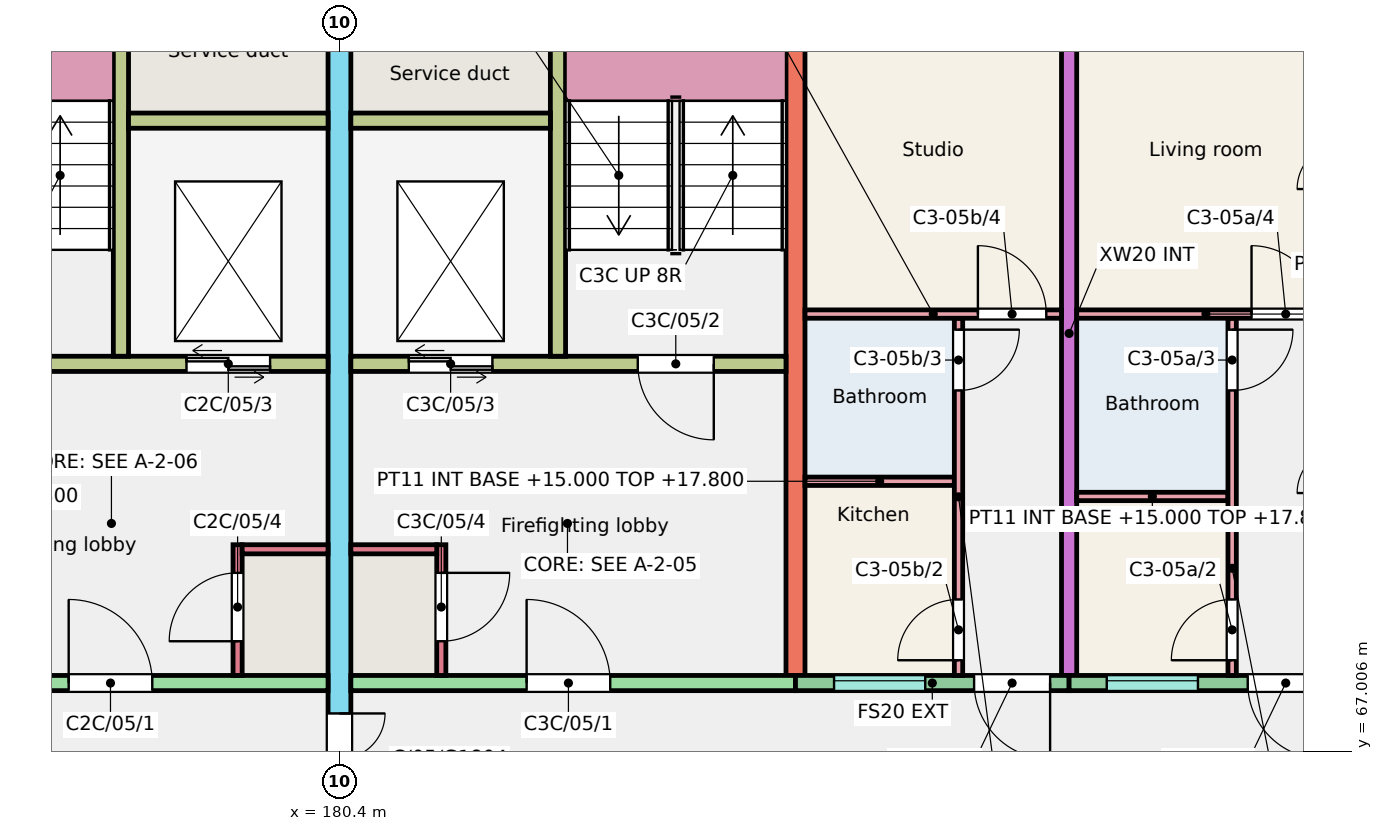
"""IFC4 building model, lengths in metres.
Left out: names, types, materials, properties, quantities, classifications, styles, units other than length and angle.
Written with IfcOpenShell. Run it as: python <this file> out.ifc"""

import sys

from ifc_helpers import new_model, si_unit, direction, frame, frame_2d, origin, place, context, subcontext, project, spatial, rectangle, extrude, element, fill, save


model = new_model("IFC4")
c1 = context("Model", 3, precision=1e-05, world=origin(), true_north=direction((0.0, 1.0)))
c2 = subcontext(c1, "Body", "Model", "MODEL_VIEW")
j1 = project(units=[si_unit("LENGTHUNIT", "METRE"), si_unit("PLANEANGLEUNIT", "RADIAN")], contexts=[c1])
p1 = place(None, origin())
s1 = spatial("IfcSite", under=j1, at=p1, CompositionType="ELEMENT")
p2 = place(p1, origin())
s2 = spatial("IfcBuilding", under=s1, at=p2, CompositionType="ELEMENT")
p3 = place(p2, frame((0.0, 0.0, 15.0)))
s3 = spatial("IfcBuildingStorey", under=s2, at=p3, CompositionType="ELEMENT", Elevation=15.0)
p4 = place(p3, frame((180.4, 66.0, 0.0), z_axis=(0.0, 0.0, 1.0), x_axis=(0.0, 1.0, 0.0)))
e1 = element("IfcWall", 1, at=p4, inside=s3, PredefinedType="SHEAR", context=c2, shape_type="SweptSolid", body=[
    extrude(rectangle(XDim=11.0, YDim=0.3, at=frame_2d((5.5, 0.0))), origin(), (0.0, 0.0, 1.0), 3.0),
])
p5 = place(p4, frame((0.3, 0.0, 0.0)))
e2 = element("IfcOpeningElement", 2, at=p5, cuts=e1, PredefinedType="OPENING", context=c2, shape_type="SweptSolid", body=[
    extrude(rectangle(XDim=1.2, YDim=2.1, at=frame_2d((0.6, 1.05))), frame((0.0, 0.16, 0.0), z_axis=(0.0, -1.0, 0.0), x_axis=(1.0, 0.0, 0.0)), (0.0, 0.0, 1.0), 0.32),
])
p6 = place(p3, frame((186.4, 68.0, 0.0), z_axis=(0.0, 0.0, 1.0), x_axis=(0.0, 1.0, 0.0)))
e3 = element("IfcWall", 3, at=p6, inside=s3, PredefinedType="SHEAR", context=c2, shape_type="SweptSolid", body=[
    extrude(rectangle(XDim=9.0, YDim=0.25, at=frame_2d((4.5, 0.0))), origin(), (0.0, 0.0, 1.0), 3.0),
])
p7 = place(p3, frame((190.0, 68.0, 0.0), z_axis=(0.0, 0.0, 1.0), x_axis=(0.0, 1.0, 0.0)))
e4 = element("IfcWall", 4, at=p7, inside=s3, PredefinedType="SHEAR", context=c2, shape_type="SweptSolid", body=[
    extrude(rectangle(XDim=9.0, YDim=0.2, at=frame_2d((4.5, 0.0))), origin(), (0.0, 0.0, 1.0), 3.0),
])
p8 = place(p3, frame((174.4, 67.9, 0.0), z_axis=(0.0, 0.0, 1.0), x_axis=(1.0, 0.0, 0.0)))
e5 = element("IfcWall", 5, at=p8, inside=s3, PredefinedType="SHEAR", context=c2, shape_type="SweptSolid", body=[
    extrude(rectangle(XDim=5.85, YDim=0.2, at=frame_2d((2.925, 0.0))), origin(), (0.0, 0.0, 1.0), 3.0),
])
p9 = place(p8, frame((2.438, 0.0, 0.0)))
e6 = element("IfcOpeningElement", 6, at=p9, cuts=e5, PredefinedType="OPENING", context=c2, shape_type="SweptSolid", body=[
    extrude(rectangle(XDim=1.1, YDim=2.1, at=frame_2d((0.55, 1.05))), frame((0.0, 0.11, 0.0), z_axis=(0.0, -1.0, 0.0), x_axis=(1.0, 0.0, 0.0)), (0.0, 0.0, 1.0), 0.22),
])
p10 = place(p3, frame((174.525, 72.1, 0.0), z_axis=(0.0, 0.0, 1.0), x_axis=(1.0, 0.0, 0.0)))
e7 = element("IfcWall", 7, at=p10, inside=s3, PredefinedType="SHEAR", context=c2, shape_type="SweptSolid", body=[
    extrude(rectangle(XDim=5.725, YDim=0.2, at=frame_2d((2.863, 0.0))), origin(), (0.0, 0.0, 1.0), 3.0),
])
p11 = place(p10, frame((0.95, 0.0, 0.0)))
e8 = element("IfcOpeningElement", 8, at=p11, cuts=e7, PredefinedType="OPENING", context=c2, shape_type="SweptSolid", body=[
    extrude(rectangle(XDim=1.0, YDim=2.1, at=frame_2d((0.5, 1.05))), frame((0.0, 0.11, 0.0), z_axis=(0.0, -1.0, 0.0), x_axis=(1.0, 0.0, 0.0)), (0.0, 0.0, 1.0), 0.22),
])
p12 = place(p10, frame((3.863, 0.0, 0.0)))
e9 = element("IfcOpeningElement", 9, at=p12, cuts=e7, PredefinedType="OPENING", context=c2, shape_type="SweptSolid", body=[
    extrude(rectangle(XDim=1.1, YDim=2.1, at=frame_2d((0.55, 1.05))), frame((0.0, 0.11, 0.0), z_axis=(0.0, -1.0, 0.0), x_axis=(1.0, 0.0, 0.0)), (0.0, 0.0, 1.0), 0.22),
])
p13 = place(p3, frame((177.525, 72.2, 0.0), z_axis=(0.0, 0.0, 1.0), x_axis=(0.0, 1.0, 0.0)))
e10 = element("IfcWall", 10, at=p13, inside=s3, PredefinedType="SHEAR", context=c2, shape_type="SweptSolid", body=[
    extrude(rectangle(XDim=4.8, YDim=0.2, at=frame_2d((2.4, 0.0))), origin(), (0.0, 0.0, 1.0), 3.0),
])
p14 = place(p3, frame((177.625, 75.3, 0.0), z_axis=(0.0, 0.0, 1.0), x_axis=(1.0, 0.0, 0.0)))
e11 = element("IfcWall", 11, at=p14, inside=s3, PredefinedType="SHEAR", context=c2, shape_type="SweptSolid", body=[
    extrude(rectangle(XDim=2.625, YDim=0.2, at=frame_2d((1.312, 0.0))), origin(), (0.0, 0.0, 1.0), 3.0),
])
p15 = place(p3, frame((179.06, 68.0, 0.0), z_axis=(0.0, 0.0, 1.0), x_axis=(0.0, 1.0, 0.0)))
e12 = element("IfcWall", 12, at=p15, inside=s3, PredefinedType="SHEAR", context=c2, shape_type="SweptSolid", body=[
    extrude(rectangle(XDim=1.72, YDim=0.12, at=frame_2d((0.86, 0.0))), origin(), (0.0, 0.0, 1.0), 3.0),
])
p16 = place(p15, frame((0.45, 0.0, 0.0)))
e13 = element("IfcOpeningElement", 13, at=p16, cuts=e12, PredefinedType="OPENING", context=c2, shape_type="SweptSolid", body=[
    extrude(rectangle(XDim=0.9, YDim=2.1, at=frame_2d((0.45, 1.05))), frame((0.0, 0.07, 0.0), z_axis=(0.0, -1.0, 0.0), x_axis=(1.0, 0.0, 0.0)), (0.0, 0.0, 1.0), 0.14),
])
p17 = place(p3, frame((179.12, 69.66, 0.0), z_axis=(0.0, 0.0, 1.0), x_axis=(1.0, 0.0, 0.0)))
e14 = element("IfcWall", 14, at=p17, inside=s3, PredefinedType="SHEAR", context=c2, shape_type="SweptSolid", body=[
    extrude(rectangle(XDim=1.13, YDim=0.12, at=frame_2d((0.565, 0.0))), origin(), (0.0, 0.0, 1.0), 3.0),
])
p18 = place(p3, frame((180.55, 67.9, 0.0), z_axis=(0.0, 0.0, 1.0), x_axis=(1.0, 0.0, 0.0)))
e15 = element("IfcWall", 15, at=p18, inside=s3, PredefinedType="SHEAR", context=c2, shape_type="SweptSolid", body=[
    extrude(rectangle(XDim=5.85, YDim=0.2, at=frame_2d((2.925, 0.0))), origin(), (0.0, 0.0, 1.0), 3.0),
])
p19 = place(p18, frame((2.312, 0.0, 0.0)))
e16 = element("IfcOpeningElement", 16, at=p19, cuts=e15, PredefinedType="OPENING", context=c2, shape_type="SweptSolid", body=[
    extrude(rectangle(XDim=1.1, YDim=2.1, at=frame_2d((0.55, 1.05))), frame((0.0, 0.11, 0.0), z_axis=(0.0, -1.0, 0.0), x_axis=(1.0, 0.0, 0.0)), (0.0, 0.0, 1.0), 0.22),
])
p20 = place(p3, frame((180.55, 72.1, 0.0), z_axis=(0.0, 0.0, 1.0), x_axis=(1.0, 0.0, 0.0)))
e17 = element("IfcWall", 17, at=p20, inside=s3, PredefinedType="SHEAR", context=c2, shape_type="SweptSolid", body=[
    extrude(rectangle(XDim=5.725, YDim=0.2, at=frame_2d((2.862, 0.0))), origin(), (0.0, 0.0, 1.0), 3.0),
])
p21 = place(p20, frame((3.775, 0.0, 0.0)))
e18 = element("IfcOpeningElement", 18, at=p21, cuts=e17, PredefinedType="OPENING", context=c2, shape_type="SweptSolid", body=[
    extrude(rectangle(XDim=1.0, YDim=2.1, at=frame_2d((0.5, 1.05))), frame((0.0, 0.11, 0.0), z_axis=(0.0, -1.0, 0.0), x_axis=(1.0, 0.0, 0.0)), (0.0, 0.0, 1.0), 0.22),
])
p22 = place(p20, frame((0.762, 0.0, 0.0)))
e19 = element("IfcOpeningElement", 19, at=p22, cuts=e17, PredefinedType="OPENING", context=c2, shape_type="SweptSolid", body=[
    extrude(rectangle(XDim=1.1, YDim=2.1, at=frame_2d((0.55, 1.05))), frame((0.0, 0.11, 0.0), z_axis=(0.0, -1.0, 0.0), x_axis=(1.0, 0.0, 0.0)), (0.0, 0.0, 1.0), 0.22),
])
p23 = place(p3, frame((183.275, 72.2, 0.0), z_axis=(0.0, 0.0, 1.0), x_axis=(0.0, 1.0, 0.0)))
e20 = element("IfcWall", 20, at=p23, inside=s3, PredefinedType="SHEAR", context=c2, shape_type="SweptSolid", body=[
    extrude(rectangle(XDim=4.8, YDim=0.2, at=frame_2d((2.4, 0.0))), origin(), (0.0, 0.0, 1.0), 3.0),
])
p24 = place(p3, frame((180.55, 75.3, 0.0), z_axis=(0.0, 0.0, 1.0), x_axis=(1.0, 0.0, 0.0)))
e21 = element("IfcWall", 21, at=p24, inside=s3, PredefinedType="SHEAR", context=c2, shape_type="SweptSolid", body=[
    extrude(rectangle(XDim=2.625, YDim=0.2, at=frame_2d((1.312, 0.0))), origin(), (0.0, 0.0, 1.0), 3.0),
])
p25 = place(p3, frame((181.74, 68.0, 0.0), z_axis=(0.0, 0.0, 1.0), x_axis=(0.0, 1.0, 0.0)))
e22 = element("IfcWall", 22, at=p25, inside=s3, PredefinedType="SHEAR", context=c2, shape_type="SweptSolid", body=[
    extrude(rectangle(XDim=1.72, YDim=0.12, at=frame_2d((0.86, 0.0))), origin(), (0.0, 0.0, 1.0), 3.0),
])
p26 = place(p25, frame((0.45, 0.0, 0.0)))
e23 = element("IfcOpeningElement", 23, at=p26, cuts=e22, PredefinedType="OPENING", context=c2, shape_type="SweptSolid", body=[
    extrude(rectangle(XDim=0.9, YDim=2.1, at=frame_2d((0.45, 1.05))), frame((0.0, 0.07, 0.0), z_axis=(0.0, -1.0, 0.0), x_axis=(1.0, 0.0, 0.0)), (0.0, 0.0, 1.0), 0.14),
])
p27 = place(p3, frame((180.55, 69.66, 0.0), z_axis=(0.0, 0.0, 1.0), x_axis=(1.0, 0.0, 0.0)))
e24 = element("IfcWall", 24, at=p27, inside=s3, PredefinedType="SHEAR", context=c2, shape_type="SweptSolid", body=[
    extrude(rectangle(XDim=1.13, YDim=0.12, at=frame_2d((0.565, 0.0))), origin(), (0.0, 0.0, 1.0), 3.0),
])
p28 = place(p3, frame((186.4, 67.9, 0.0), z_axis=(0.0, 0.0, 1.0), x_axis=(1.0, 0.0, 0.0)))
e25 = element("IfcWall", 25, at=p28, inside=s3, PredefinedType="SOLIDWALL", context=c2, shape_type="SweptSolid", body=[
    extrude(rectangle(XDim=3.6, YDim=0.2, at=frame_2d((1.8, 0.0))), origin(), (0.0, 0.0, 1.0), 3.0),
])
p29 = place(p28, frame((0.508, 0.0, 1.1)))
e26 = element("IfcOpeningElement", 26, at=p29, cuts=e25, PredefinedType="OPENING", context=c2, shape_type="SweptSolid", body=[
    extrude(rectangle(XDim=1.2, YDim=1.3, at=frame_2d((0.6, 0.65))), frame((0.0, 0.11, 0.0), z_axis=(0.0, -1.0, 0.0), x_axis=(1.0, 0.0, 0.0)), (0.0, 0.0, 1.0), 0.22),
])
p30 = place(p28, frame((2.35, 0.0, 0.0)))
e27 = element("IfcOpeningElement", 27, at=p30, cuts=e25, PredefinedType="OPENING", context=c2, shape_type="SweptSolid", body=[
    extrude(rectangle(XDim=1.0, YDim=2.1, at=frame_2d((0.5, 1.05))), frame((0.0, 0.11, 0.0), z_axis=(0.0, -1.0, 0.0), x_axis=(1.0, 0.0, 0.0)), (0.0, 0.0, 1.0), 0.22),
])
p31 = place(p3, frame((190.0, 67.9, 0.0), z_axis=(0.0, 0.0, 1.0), x_axis=(1.0, 0.0, 0.0)))
e28 = element("IfcWall", 28, at=p31, inside=s3, PredefinedType="SOLIDWALL", context=c2, shape_type="SweptSolid", body=[
    extrude(rectangle(XDim=3.6, YDim=0.2, at=frame_2d((1.8, 0.0))), origin(), (0.0, 0.0, 1.0), 3.0),
])
p32 = place(p31, frame((0.495, 0.0, 1.1)))
e29 = element("IfcOpeningElement", 29, at=p32, cuts=e28, PredefinedType="OPENING", context=c2, shape_type="SweptSolid", body=[
    extrude(rectangle(XDim=1.2, YDim=1.3, at=frame_2d((0.6, 0.65))), frame((0.0, 0.11, 0.0), z_axis=(0.0, -1.0, 0.0), x_axis=(1.0, 0.0, 0.0)), (0.0, 0.0, 1.0), 0.22),
])
p33 = place(p31, frame((2.35, 0.0, 0.0)))
e30 = element("IfcOpeningElement", 30, at=p33, cuts=e28, PredefinedType="OPENING", context=c2, shape_type="SweptSolid", body=[
    extrude(rectangle(XDim=1.0, YDim=2.1, at=frame_2d((0.5, 1.05))), frame((0.0, 0.11, 0.0), z_axis=(0.0, -1.0, 0.0), x_axis=(1.0, 0.0, 0.0)), (0.0, 0.0, 1.0), 0.22),
])
p34 = place(p3, frame((190.1, 70.355, 0.0), z_axis=(0.0, 0.0, 1.0), x_axis=(1.0, 0.0, 0.0)))
e31 = element("IfcWall", 31, at=p34, inside=s3, PredefinedType="PARTITIONING", context=c2, shape_type="SweptSolid", body=[
    extrude(rectangle(XDim=1.99, YDim=0.11, at=frame_2d((0.995, 0.0))), origin(), (0.0, 0.0, 1.0), 2.8),
])
p35 = place(p3, frame((192.145, 68.0, 0.0), z_axis=(0.0, 0.0, 1.0), x_axis=(0.0, 1.0, 0.0)))
e32 = element("IfcWall", 32, at=p35, inside=s3, PredefinedType="PARTITIONING", context=c2, shape_type="SweptSolid", body=[
    extrude(rectangle(XDim=4.7, YDim=0.11, at=frame_2d((2.35, 0.0))), origin(), (0.0, 0.0, 1.0), 2.8),
])
p36 = place(p35, frame((0.2, 0.0, 0.0)))
e33 = element("IfcOpeningElement", 33, at=p36, cuts=e32, PredefinedType="OPENING", context=c2, shape_type="SweptSolid", body=[
    extrude(rectangle(XDim=0.8, YDim=2.1, at=frame_2d((0.4, 1.05))), frame((0.0, 0.065, 0.0), z_axis=(0.0, -1.0, 0.0), x_axis=(1.0, 0.0, 0.0)), (0.0, 0.0, 1.0), 0.13),
])
p37 = place(p35, frame((3.75, 0.0, 0.0)))
e34 = element("IfcOpeningElement", 34, at=p37, cuts=e32, PredefinedType="OPENING", context=c2, shape_type="SweptSolid", body=[
    extrude(rectangle(XDim=0.8, YDim=2.1, at=frame_2d((0.4, 1.05))), frame((0.0, 0.065, 0.0), z_axis=(0.0, -1.0, 0.0), x_axis=(1.0, 0.0, 0.0)), (0.0, 0.0, 1.0), 0.13),
])
p38 = place(p3, frame((190.1, 72.755, 0.0), z_axis=(0.0, 0.0, 1.0), x_axis=(1.0, 0.0, 0.0)))
e35 = element("IfcWall", 35, at=p38, inside=s3, PredefinedType="PARTITIONING", context=c2, shape_type="SweptSolid", body=[
    extrude(rectangle(XDim=3.4, YDim=0.11, at=frame_2d((1.7, 0.0))), origin(), (0.0, 0.0, 1.0), 2.8),
])
p39 = place(p38, frame((2.3, 0.0, 0.0)))
e36 = element("IfcOpeningElement", 36, at=p39, cuts=e35, PredefinedType="OPENING", context=c2, shape_type="SweptSolid", body=[
    extrude(rectangle(XDim=0.9, YDim=2.1, at=frame_2d((0.45, 1.05))), frame((0.0, 0.065, 0.0), z_axis=(0.0, -1.0, 0.0), x_axis=(1.0, 0.0, 0.0)), (0.0, 0.0, 1.0), 0.13),
])
p40 = place(p3, frame((186.525, 70.555, 0.0), z_axis=(0.0, 0.0, 1.0), x_axis=(1.0, 0.0, 0.0)))
e37 = element("IfcWall", 37, at=p40, inside=s3, PredefinedType="PARTITIONING", context=c2, shape_type="SweptSolid", body=[
    extrude(rectangle(XDim=1.965, YDim=0.11, at=frame_2d((0.982, 0.0))), origin(), (0.0, 0.0, 1.0), 2.8),
])
p41 = place(p3, frame((188.545, 68.0, 0.0), z_axis=(0.0, 0.0, 1.0), x_axis=(0.0, 1.0, 0.0)))
e38 = element("IfcWall", 38, at=p41, inside=s3, PredefinedType="PARTITIONING", context=c2, shape_type="SweptSolid", body=[
    extrude(rectangle(XDim=4.7, YDim=0.11, at=frame_2d((2.35, 0.0))), origin(), (0.0, 0.0, 1.0), 2.8),
])
p42 = place(p41, frame((0.2, 0.0, 0.0)))
e39 = element("IfcOpeningElement", 39, at=p42, cuts=e38, PredefinedType="OPENING", context=c2, shape_type="SweptSolid", body=[
    extrude(rectangle(XDim=0.8, YDim=2.1, at=frame_2d((0.4, 1.05))), frame((0.0, 0.065, 0.0), z_axis=(0.0, -1.0, 0.0), x_axis=(1.0, 0.0, 0.0)), (0.0, 0.0, 1.0), 0.13),
])
p43 = place(p41, frame((3.75, 0.0, 0.0)))
e40 = element("IfcOpeningElement", 40, at=p43, cuts=e38, PredefinedType="OPENING", context=c2, shape_type="SweptSolid", body=[
    extrude(rectangle(XDim=0.8, YDim=2.1, at=frame_2d((0.4, 1.05))), frame((0.0, 0.065, 0.0), z_axis=(0.0, -1.0, 0.0), x_axis=(1.0, 0.0, 0.0)), (0.0, 0.0, 1.0), 0.13),
])
p44 = place(p3, frame((186.525, 72.755, 0.0), z_axis=(0.0, 0.0, 1.0), x_axis=(1.0, 0.0, 0.0)))
e41 = element("IfcWall", 41, at=p44, inside=s3, PredefinedType="PARTITIONING", context=c2, shape_type="SweptSolid", body=[
    extrude(rectangle(XDim=3.375, YDim=0.11, at=frame_2d((1.688, 0.0))), origin(), (0.0, 0.0, 1.0), 2.8),
])
p45 = place(p44, frame((2.275, 0.0, 0.0)))
e42 = element("IfcOpeningElement", 42, at=p45, cuts=e41, PredefinedType="OPENING", context=c2, shape_type="SweptSolid", body=[
    extrude(rectangle(XDim=0.9, YDim=2.1, at=frame_2d((0.45, 1.05))), frame((0.0, 0.065, 0.0), z_axis=(0.0, -1.0, 0.0), x_axis=(1.0, 0.0, 0.0)), (0.0, 0.0, 1.0), 0.13),
])
p46 = place(p32, origin())
e43 = element("IfcWindow", 43, at=p46, inside=s3, PartitioningType="SINGLE_PANEL", PredefinedType="WINDOW", context=c2, shape_type="SweptSolid", body=[
    extrude(rectangle(XDim=1.2, YDim=1.3, at=frame_2d((0.6, 0.65))), frame((0.0, 0.06, 0.0), z_axis=(0.0, -1.0, 0.0), x_axis=(1.0, 0.0, 0.0)), (0.0, 0.0, 1.0), 0.06),
])
fill(e29, e43)
p47 = place(p29, origin())
e44 = element("IfcWindow", 44, at=p47, inside=s3, PartitioningType="SINGLE_PANEL", PredefinedType="WINDOW", context=c2, shape_type="SweptSolid", body=[
    extrude(rectangle(XDim=1.2, YDim=1.3, at=frame_2d((0.6, 0.65))), frame((0.0, 0.06, 0.0), z_axis=(0.0, -1.0, 0.0), x_axis=(1.0, 0.0, 0.0)), (0.0, 0.0, 1.0), 0.06),
])
fill(e26, e44)
p48 = place(p33, origin())
e45 = element("IfcDoor", 45, at=p48, inside=s3, OperationType="SINGLE_SWING_RIGHT", PredefinedType="DOOR", context=c2, shape_type="SweptSolid", body=[
    extrude(rectangle(XDim=1.0, YDim=2.1, at=frame_2d((0.5, 1.05))), frame((0.0, 0.025, 0.0), z_axis=(0.0, -1.0, 0.0), x_axis=(1.0, 0.0, 0.0)), (0.0, 0.0, 1.0), 0.05),
])
fill(e30, e45)
p49 = place(p36, origin())
e46 = element("IfcDoor", 46, at=p49, inside=s3, OperationType="SINGLE_SWING_LEFT", PredefinedType="DOOR", context=c2, shape_type="SweptSolid", body=[
    extrude(rectangle(XDim=0.8, YDim=2.1, at=frame_2d((0.4, 1.05))), frame((0.0, 0.025, 0.0), z_axis=(0.0, -1.0, 0.0), x_axis=(1.0, 0.0, 0.0)), (0.0, 0.0, 1.0), 0.05),
])
fill(e33, e46)
p50 = place(p37, origin())
e47 = element("IfcDoor", 47, at=p50, inside=s3, OperationType="SINGLE_SWING_RIGHT", PredefinedType="DOOR", context=c2, shape_type="SweptSolid", body=[
    extrude(rectangle(XDim=0.8, YDim=2.1, at=frame_2d((0.4, 1.05))), frame((0.0, 0.025, 0.0), z_axis=(0.0, -1.0, 0.0), x_axis=(1.0, 0.0, 0.0)), (0.0, 0.0, 1.0), 0.05),
])
fill(e34, e47)
p51 = place(p39, origin())
e48 = element("IfcDoor", 48, at=p51, inside=s3, OperationType="SINGLE_SWING_LEFT", PredefinedType="DOOR", context=c2, shape_type="SweptSolid", body=[
    extrude(rectangle(XDim=0.9, YDim=2.1, at=frame_2d((0.45, 1.05))), frame((0.0, 0.025, 0.0), z_axis=(0.0, -1.0, 0.0), x_axis=(1.0, 0.0, 0.0)), (0.0, 0.0, 1.0), 0.05),
])
fill(e36, e48)
p52 = place(p30, origin())
e49 = element("IfcDoor", 49, at=p52, inside=s3, OperationType="SINGLE_SWING_RIGHT", PredefinedType="DOOR", context=c2, shape_type="SweptSolid", body=[
    extrude(rectangle(XDim=1.0, YDim=2.1, at=frame_2d((0.5, 1.05))), frame((0.0, 0.025, 0.0), z_axis=(0.0, -1.0, 0.0), x_axis=(1.0, 0.0, 0.0)), (0.0, 0.0, 1.0), 0.05),
])
fill(e27, e49)
p53 = place(p42, origin())
e50 = element("IfcDoor", 50, at=p53, inside=s3, OperationType="SINGLE_SWING_LEFT", PredefinedType="DOOR", context=c2, shape_type="SweptSolid", body=[
    extrude(rectangle(XDim=0.8, YDim=2.1, at=frame_2d((0.4, 1.05))), frame((0.0, 0.025, 0.0), z_axis=(0.0, -1.0, 0.0), x_axis=(1.0, 0.0, 0.0)), (0.0, 0.0, 1.0), 0.05),
])
fill(e39, e50)
p54 = place(p43, origin())
e51 = element("IfcDoor", 51, at=p54, inside=s3, OperationType="SINGLE_SWING_RIGHT", PredefinedType="DOOR", context=c2, shape_type="SweptSolid", body=[
    extrude(rectangle(XDim=0.8, YDim=2.1, at=frame_2d((0.4, 1.05))), frame((0.0, 0.025, 0.0), z_axis=(0.0, -1.0, 0.0), x_axis=(1.0, 0.0, 0.0)), (0.0, 0.0, 1.0), 0.05),
])
fill(e40, e51)
p55 = place(p45, origin())
e52 = element("IfcDoor", 52, at=p55, inside=s3, OperationType="SINGLE_SWING_LEFT", PredefinedType="DOOR", context=c2, shape_type="SweptSolid", body=[
    extrude(rectangle(XDim=0.9, YDim=2.1, at=frame_2d((0.45, 1.05))), frame((0.0, 0.025, 0.0), z_axis=(0.0, -1.0, 0.0), x_axis=(1.0, 0.0, 0.0)), (0.0, 0.0, 1.0), 0.05),
])
fill(e42, e52)
p56 = place(p9, origin())
e53 = element("IfcDoor", 53, at=p56, inside=s3, OperationType="SINGLE_SWING_LEFT", PredefinedType="DOOR", context=c2, shape_type="SweptSolid", body=[
    extrude(rectangle(XDim=1.1, YDim=2.1, at=frame_2d((0.55, 1.05))), frame((0.0, 0.025, 0.0), z_axis=(0.0, -1.0, 0.0), x_axis=(1.0, 0.0, 0.0)), (0.0, 0.0, 1.0), 0.05),
])
fill(e6, e53)
p57 = place(p12, origin())
e54 = element("IfcDoor", 54, at=p57, inside=s3, OperationType="DOUBLE_DOOR_SLIDING", PredefinedType="DOOR", context=c2, shape_type="SweptSolid", body=[
    extrude(rectangle(XDim=1.1, YDim=2.1, at=frame_2d((0.55, 1.05))), frame((0.0, 0.025, 0.0), z_axis=(0.0, -1.0, 0.0), x_axis=(1.0, 0.0, 0.0)), (0.0, 0.0, 1.0), 0.05),
])
fill(e9, e54)
p58 = place(p16, origin())
e55 = element("IfcDoor", 55, at=p58, inside=s3, OperationType="SINGLE_SWING_LEFT", PredefinedType="DOOR", context=c2, shape_type="SweptSolid", body=[
    extrude(rectangle(XDim=0.9, YDim=2.1, at=frame_2d((0.45, 1.05))), frame((0.0, 0.025, 0.0), z_axis=(0.0, -1.0, 0.0), x_axis=(1.0, 0.0, 0.0)), (0.0, 0.0, 1.0), 0.05),
])
fill(e13, e55)
p59 = place(p19, origin())
e56 = element("IfcDoor", 56, at=p59, inside=s3, OperationType="SINGLE_SWING_LEFT", PredefinedType="DOOR", context=c2, shape_type="SweptSolid", body=[
    extrude(rectangle(XDim=1.1, YDim=2.1, at=frame_2d((0.55, 1.05))), frame((0.0, 0.025, 0.0), z_axis=(0.0, -1.0, 0.0), x_axis=(1.0, 0.0, 0.0)), (0.0, 0.0, 1.0), 0.05),
])
fill(e16, e56)
p60 = place(p21, origin())
e57 = element("IfcDoor", 57, at=p60, inside=s3, OperationType="SINGLE_SWING_RIGHT", PredefinedType="DOOR", context=c2, shape_type="SweptSolid", body=[
    extrude(rectangle(XDim=1.0, YDim=2.1, at=frame_2d((0.5, 1.05))), frame((0.0, 0.025, 0.0), z_axis=(0.0, -1.0, 0.0), x_axis=(1.0, 0.0, 0.0)), (0.0, 0.0, 1.0), 0.05),
])
fill(e18, e57)
p61 = place(p22, origin())
e58 = element("IfcDoor", 58, at=p61, inside=s3, OperationType="DOUBLE_DOOR_SLIDING", PredefinedType="DOOR", context=c2, shape_type="SweptSolid", body=[
    extrude(rectangle(XDim=1.1, YDim=2.1, at=frame_2d((0.55, 1.05))), frame((0.0, 0.025, 0.0), z_axis=(0.0, -1.0, 0.0), x_axis=(1.0, 0.0, 0.0)), (0.0, 0.0, 1.0), 0.05),
])
fill(e19, e58)
p62 = place(p26, origin())
e59 = element("IfcDoor", 59, at=p62, inside=s3, OperationType="SINGLE_SWING_RIGHT", PredefinedType="DOOR", context=c2, shape_type="SweptSolid", body=[
    extrude(rectangle(XDim=0.9, YDim=2.1, at=frame_2d((0.45, 1.05))), frame((0.0, 0.025, 0.0), z_axis=(0.0, -1.0, 0.0), x_axis=(1.0, 0.0, 0.0)), (0.0, 0.0, 1.0), 0.05),
])
fill(e23, e59)
p63 = place(p5, origin())
e60 = element("IfcDoor", 60, at=p63, inside=s3, OperationType="DOUBLE_DOOR_SINGLE_SWING", PredefinedType="DOOR", context=c2, shape_type="SweptSolid", body=[
    extrude(rectangle(XDim=1.2, YDim=2.1, at=frame_2d((0.6, 1.05))), frame((0.0, 0.025, 0.0), z_axis=(0.0, -1.0, 0.0), x_axis=(1.0, 0.0, 0.0)), (0.0, 0.0, 1.0), 0.05),
])
fill(e2, e60)
save(model, sys.argv[1])
